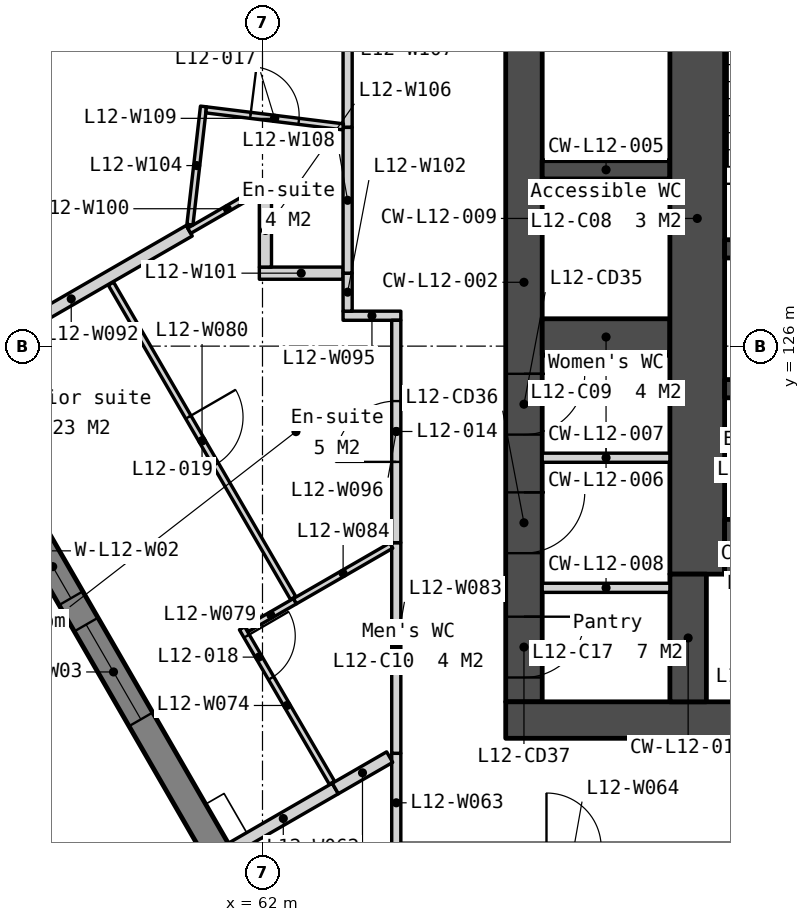
"""IFC4 building model, lengths in metres.
Left out: names, types, materials, properties, quantities, classifications, styles, units other than length and angle.
Written with IfcOpenShell. Run it as: python <this file> out.ifc"""

import sys

from ifc_helpers import new_model, si_unit, direction, frame, frame_2d, origin, origin_2d, place, context, subcontext, project, spatial, polyline, rectangle, outline, extrude, element, fill, save


model = new_model("IFC4")
c1 = context("Model", 3, precision=1e-05, world=origin(), true_north=direction((0.0, 1.0)))
c2 = subcontext(c1, "Body", "Model", "MODEL_VIEW")
j1 = project(units=[si_unit("LENGTHUNIT", "METRE"), si_unit("PLANEANGLEUNIT", "RADIAN")], contexts=[c1])
p1 = place(None, origin())
s1 = spatial("IfcSite", under=j1, at=p1, CompositionType="ELEMENT")
p2 = place(p1, origin())
s2 = spatial("IfcBuilding", under=s1, at=p2, CompositionType="ELEMENT")
p3 = place(p2, frame((0.0, 0.0, 56.0)))
s3 = spatial("IfcBuildingStorey", under=s2, at=p3, CompositionType="ELEMENT", Elevation=56.0)
p4 = place(p3, frame((57.336, 131.342, 0.0), z_axis=(0.0, 0.0, 1.0), x_axis=(-0.5, -0.866025403784, 0.0)))
e1 = element("IfcColumn", 1, at=p4, inside=s3, PredefinedType="COLUMN", context=c2, shape_type="SweptSolid", body=[
    extrude(rectangle(XDim=2.0, YDim=2.0, at=origin_2d()), origin(), (0.0, 0.0, 1.0), 3.5),
])
p5 = place(p3, frame((66.3, 133.95, 0.0), z_axis=(0.0, 0.0, 1.0), x_axis=(0.0, -1.0, 0.0)))
e2 = element("IfcWall", 2, at=p5, inside=s3, PredefinedType="SOLIDWALL", context=c2, shape_type="SweptSolid", body=[
    extrude(rectangle(XDim=13.8, YDim=0.6, at=frame_2d((6.9, 0.0))), origin(), (0.0, 0.0, 1.0), 3.35),
])
p6 = place(p5, frame((0.6, 0.0, 0.0)))
e3 = element("IfcOpeningElement", 3, at=p6, cuts=e2, PredefinedType="OPENING", context=c2, shape_type="SweptSolid", body=[
    extrude(rectangle(XDim=1.1, YDim=2.1, at=frame_2d((0.55, 1.05))), frame((0.0, 0.31, 0.0), z_axis=(0.0, -1.0, 0.0), x_axis=(1.0, 0.0, 0.0)), (0.0, 0.0, 1.0), 0.62),
])
p7 = place(p5, frame((8.405, 0.0, 0.0)))
e4 = element("IfcOpeningElement", 4, at=p7, cuts=e2, PredefinedType="OPENING", context=c2, shape_type="SweptSolid", body=[
    extrude(rectangle(XDim=1.0, YDim=2.1, at=frame_2d((0.5, 1.05))), frame((0.0, 0.31, 0.0), z_axis=(0.0, -1.0, 0.0), x_axis=(1.0, 0.0, 0.0)), (0.0, 0.0, 1.0), 0.62),
])
p8 = place(p5, frame((10.355, 0.0, 0.0)))
e5 = element("IfcOpeningElement", 5, at=p8, cuts=e2, PredefinedType="OPENING", context=c2, shape_type="SweptSolid", body=[
    extrude(rectangle(XDim=1.0, YDim=2.1, at=frame_2d((0.5, 1.05))), frame((0.0, 0.31, 0.0), z_axis=(0.0, -1.0, 0.0), x_axis=(1.0, 0.0, 0.0)), (0.0, 0.0, 1.0), 0.62),
])
p9 = place(p5, frame((12.4, 0.0, 0.0)))
e6 = element("IfcOpeningElement", 6, at=p9, cuts=e2, PredefinedType="OPENING", context=c2, shape_type="SweptSolid", body=[
    extrude(rectangle(XDim=1.0, YDim=2.1, at=frame_2d((0.5, 1.05))), frame((0.0, 0.31, 0.0), z_axis=(0.0, -1.0, 0.0), x_axis=(1.0, 0.0, 0.0)), (0.0, 0.0, 1.0), 0.62),
])
p10 = place(p3, frame((66.0, 119.85, 0.0), z_axis=(0.0, 0.0, 1.0), x_axis=(1.0, 0.0, 0.0)))
e7 = element("IfcWall", 7, at=p10, inside=s3, PredefinedType="SOLIDWALL", context=c2, shape_type="SweptSolid", body=[
    extrude(rectangle(XDim=28.0, YDim=0.6, at=frame_2d((14.0, 0.0))), origin(), (0.0, 0.0, 1.0), 3.35),
])
p11 = place(p10, frame((6.825, 0.0, 0.0)))
e8 = element("IfcOpeningElement", 8, at=p11, cuts=e7, PredefinedType="OPENING", context=c2, shape_type="SweptSolid", body=[
    extrude(rectangle(XDim=1.8, YDim=2.1, at=frame_2d((0.9, 1.05))), frame((0.0, 0.31, 0.0), z_axis=(0.0, -1.0, 0.0), x_axis=(1.0, 0.0, 0.0)), (0.0, 0.0, 1.0), 0.62),
])
p12 = place(p10, frame((15.85, 0.0, 0.0)))
e9 = element("IfcOpeningElement", 9, at=p12, cuts=e7, PredefinedType="OPENING", context=c2, shape_type="SweptSolid", body=[
    extrude(rectangle(XDim=1.5, YDim=2.1, at=frame_2d((0.75, 1.05))), frame((0.0, 0.31, 0.0), z_axis=(0.0, -1.0, 0.0), x_axis=(1.0, 0.0, 0.0)), (0.0, 0.0, 1.0), 0.62),
])
p13 = place(p10, frame((19.375, 0.0, 0.0)))
e10 = element("IfcOpeningElement", 10, at=p13, cuts=e7, PredefinedType="OPENING", context=c2, shape_type="SweptSolid", body=[
    extrude(rectangle(XDim=1.8, YDim=2.1, at=frame_2d((0.9, 1.05))), frame((0.0, 0.31, 0.0), z_axis=(0.0, -1.0, 0.0), x_axis=(1.0, 0.0, 0.0)), (0.0, 0.0, 1.0), 0.62),
])
p14 = place(p10, frame((4.425, 0.0, 0.0)))
e11 = element("IfcOpeningElement", 11, at=p14, cuts=e7, PredefinedType="OPENING", context=c2, shape_type="SweptSolid", body=[
    extrude(rectangle(XDim=1.0, YDim=2.1, at=frame_2d((0.5, 1.05))), frame((0.0, 0.31, 0.0), z_axis=(0.0, -1.0, 0.0), x_axis=(1.0, 0.0, 0.0)), (0.0, 0.0, 1.0), 0.62),
])
p15 = place(p10, frame((9.783, 0.0, 0.0)))
e12 = element("IfcOpeningElement", 12, at=p15, cuts=e7, PredefinedType="OPENING", context=c2, shape_type="SweptSolid", body=[
    extrude(rectangle(XDim=1.0, YDim=2.1, at=frame_2d((0.5, 1.05))), frame((0.0, 0.31, 0.0), z_axis=(0.0, -1.0, 0.0), x_axis=(1.0, 0.0, 0.0)), (0.0, 0.0, 1.0), 0.62),
])
p16 = place(p10, frame((11.525, 0.0, 0.0)))
e13 = element("IfcOpeningElement", 13, at=p16, cuts=e7, PredefinedType="OPENING", context=c2, shape_type="SweptSolid", body=[
    extrude(rectangle(XDim=1.0, YDim=2.1, at=frame_2d((0.5, 1.05))), frame((0.0, 0.31, 0.0), z_axis=(0.0, -1.0, 0.0), x_axis=(1.0, 0.0, 0.0)), (0.0, 0.0, 1.0), 0.62),
])
p17 = place(p10, frame((13.658, 0.0, 0.0)))
e14 = element("IfcOpeningElement", 14, at=p17, cuts=e7, PredefinedType="OPENING", context=c2, shape_type="SweptSolid", body=[
    extrude(rectangle(XDim=1.0, YDim=2.1, at=frame_2d((0.5, 1.05))), frame((0.0, 0.31, 0.0), z_axis=(0.0, -1.0, 0.0), x_axis=(1.0, 0.0, 0.0)), (0.0, 0.0, 1.0), 0.62),
])
p18 = place(p10, frame((21.725, 0.0, 0.0)))
e15 = element("IfcOpeningElement", 15, at=p18, cuts=e7, PredefinedType="OPENING", context=c2, shape_type="SweptSolid", body=[
    extrude(rectangle(XDim=1.0, YDim=2.1, at=frame_2d((0.5, 1.05))), frame((0.0, 0.31, 0.0), z_axis=(0.0, -1.0, 0.0), x_axis=(1.0, 0.0, 0.0)), (0.0, 0.0, 1.0), 0.62),
])
p19 = place(p10, frame((23.425, 0.0, 0.0)))
e16 = element("IfcOpeningElement", 16, at=p19, cuts=e7, PredefinedType="OPENING", context=c2, shape_type="SweptSolid", body=[
    extrude(rectangle(XDim=1.0, YDim=2.1, at=frame_2d((0.5, 1.05))), frame((0.0, 0.31, 0.0), z_axis=(0.0, -1.0, 0.0), x_axis=(1.0, 0.0, 0.0)), (0.0, 0.0, 1.0), 0.62),
])
p20 = place(p3, frame((66.6, 128.9, 0.0), z_axis=(0.0, 0.0, 1.0), x_axis=(1.0, 0.0, 0.0)))
e17 = element("IfcWall", 17, at=p20, inside=s3, PredefinedType="SOLIDWALL", context=c2, shape_type="SweptSolid", body=[
    extrude(rectangle(XDim=2.1, YDim=0.3, at=frame_2d((1.05, 0.0))), origin(), (0.0, 0.0, 1.0), 3.35),
])
p21 = place(p3, frame((66.6, 126.15, 0.0), z_axis=(0.0, 0.0, 1.0), x_axis=(1.0, 0.0, 0.0)))
e18 = element("IfcWall", 18, at=p21, inside=s3, PredefinedType="SOLIDWALL", context=c2, shape_type="SweptSolid", body=[
    extrude(rectangle(XDim=2.1, YDim=0.6, at=frame_2d((1.05, 0.0))), origin(), (0.0, 0.0, 1.0), 3.35),
])
for number, where, z_axis, x_axis in (
    (19, (66.6, 124.165, 0.0), (0.0, 0.0, 1.0), (1.0, 0.0, 0.0)),
    (20, (66.6, 122.025, 0.0), (0.0, 0.0, 1.0), (1.0, 0.0, 0.0)),
):
    element("IfcWall", number, at=place(p3, frame(where, z_axis=z_axis, x_axis=x_axis)), inside=s3, PredefinedType="PARTITIONING", context=c2, shape_type="SweptSolid", body=[
        extrude(rectangle(XDim=2.1, YDim=0.15, at=frame_2d((1.05, 0.0))), origin(), (0.0, 0.0, 1.0), 3.35),
    ])
p22 = place(p3, frame((69.15, 133.95, 0.0), z_axis=(0.0, 0.0, 1.0), x_axis=(0.0, -1.0, 0.0)))
e21 = element("IfcWall", 21, at=p22, inside=s3, PredefinedType="SOLIDWALL", context=c2, shape_type="SweptSolid", body=[
    extrude(rectangle(XDim=11.7, YDim=0.9, at=frame_2d((5.85, 0.0))), origin(), (0.0, 0.0, 1.0), 3.35),
])
p23 = place(p3, frame((69.0, 122.25, 0.0), z_axis=(0.0, 0.0, 1.0), x_axis=(0.0, -1.0, 0.0)))
e22 = element("IfcWall", 22, at=p23, inside=s3, PredefinedType="SOLIDWALL", context=c2, shape_type="SweptSolid", body=[
    extrude(rectangle(XDim=2.1, YDim=0.6, at=frame_2d((1.05, 0.0))), origin(), (0.0, 0.0, 1.0), 3.35),
])
for number, where, z_axis, x_axis in (
    (23, (69.6, 127.6, 0.0), (0.0, 0.0, 1.0), (1.0, 0.0, 0.0)),
    (24, (69.6, 125.3, 0.0), (0.0, 0.0, 1.0), (1.0, 0.0, 0.0)),
):
    element("IfcWall", number, at=place(p3, frame(where, z_axis=z_axis, x_axis=x_axis)), inside=s3, PredefinedType="SOLIDWALL", context=c2, shape_type="SweptSolid", body=[
        extrude(rectangle(XDim=2.55, YDim=0.3, at=frame_2d((1.275, 0.0))), origin(), (0.0, 0.0, 1.0), 3.35),
    ])
p24 = place(p3, frame((69.6, 122.7, 0.0), z_axis=(0.0, 0.0, 1.0), x_axis=(1.0, 0.0, 0.0)))
e25 = element("IfcWall", 25, at=p24, inside=s3, PredefinedType="SOLIDWALL", context=c2, shape_type="SweptSolid", body=[
    extrude(rectangle(XDim=2.55, YDim=0.9, at=frame_2d((1.275, 0.0))), origin(), (0.0, 0.0, 1.0), 3.35),
])
p25 = place(p3, frame((54.495, 129.397, -0.15), z_axis=(0.0, 0.0, 1.0), x_axis=(0.499995201193, -0.866028174359, 0.0)))
e26 = element("IfcWall", 26, at=p25, inside=s3, PredefinedType="SOLIDWALL", context=c2, shape_type="SweptSolid", body=[
    extrude(outline(polyline([(0.0, 0.0), (0.0, 3.5), (16.22, 3.5), (16.22, 0.0), (0.0, 0.0)])), frame((0.0, 0.225, 0.0), z_axis=(0.0, -1.0, 0.0), x_axis=(1.0, 0.0, 0.0)), (0.0, 0.0, 1.0), 0.45),
])
p26 = place(p25, frame((0.786, 0.0, 1.05)))
e27 = element("IfcOpeningElement", 27, at=p26, cuts=e26, PredefinedType="OPENING", context=c2, shape_type="SweptSolid", body=[
    extrude(rectangle(XDim=1.2, YDim=1.5, at=frame_2d((0.6, 0.75))), frame((0.0, 0.235, 0.0), z_axis=(0.0, -1.0, 0.0), x_axis=(1.0, 0.0, 0.0)), (0.0, 0.0, 1.0), 0.47),
])
p27 = place(p25, frame((6.91, 0.0, 1.05)))
e28 = element("IfcOpeningElement", 28, at=p27, cuts=e26, PredefinedType="OPENING", context=c2, shape_type="SweptSolid", body=[
    extrude(rectangle(XDim=1.8, YDim=1.5, at=frame_2d((0.9, 0.75))), frame((0.0, 0.235, 0.0), z_axis=(0.0, -1.0, 0.0), x_axis=(1.0, 0.0, 0.0)), (0.0, 0.0, 1.0), 0.47),
])
p28 = place(p25, frame((9.21, 0.0, 1.05)))
e29 = element("IfcOpeningElement", 29, at=p28, cuts=e26, PredefinedType="OPENING", context=c2, shape_type="SweptSolid", body=[
    extrude(rectangle(XDim=1.8, YDim=1.5, at=frame_2d((0.9, 0.75))), frame((0.0, 0.235, 0.0), z_axis=(0.0, -1.0, 0.0), x_axis=(1.0, 0.0, 0.0)), (0.0, 0.0, 1.0), 0.47),
])
p29 = place(p3, frame((61.487, 117.737, 0.0), z_axis=(0.0, 0.0, 1.0), x_axis=(0.866051805705, 0.499954267743, 0.0)))
e30 = element("IfcWall", 30, at=p29, inside=s3, PredefinedType="PARTITIONING", context=c2, shape_type="SweptSolid", body=[
    extrude(rectangle(XDim=1.975, YDim=0.2, at=frame_2d((0.988, 0.0))), origin(), (0.0, 0.0, 1.0), 3.35),
])
p30 = place(p3, frame((64.2, 117.675, 0.0), z_axis=(0.0, 0.0, 1.0), x_axis=(0.0, 1.0, 0.0)))
e31 = element("IfcWall", 31, at=p30, inside=s3, PredefinedType="PARTITIONING", context=c2, shape_type="SweptSolid", body=[
    extrude(rectangle(XDim=1.628, YDim=0.15, at=frame_2d((0.814, 0.0))), origin(), (0.0, 0.0, 1.0), 3.35),
])
p31 = place(p3, frame((61.663, 121.361, 0.0), z_axis=(0.0, 0.0, 1.0), x_axis=(0.502884554521, -0.864353587847, 0.0)))
e32 = element("IfcWall", 32, at=p31, inside=s3, PredefinedType="PARTITIONING", context=c2, shape_type="SweptSolid", body=[
    extrude(rectangle(XDim=2.94, YDim=0.1, at=frame_2d((1.47, 0.0))), origin(), (0.0, 0.0, 1.0), 3.35),
])
p32 = place(p31, frame((0.15, 0.0, 0.0)))
e33 = element("IfcOpeningElement", 33, at=p32, cuts=e32, PredefinedType="OPENING", context=c2, shape_type="SweptSolid", body=[
    extrude(rectangle(XDim=0.8, YDim=2.1, at=frame_2d((0.4, 1.05))), frame((0.0, 0.06, 0.0), z_axis=(0.0, -1.0, 0.0), x_axis=(1.0, 0.0, 0.0)), (0.0, 0.0, 1.0), 0.12),
])
p33 = place(p3, frame((63.197, 118.724, 0.0), z_axis=(0.0, 0.0, 1.0), x_axis=(0.86596515875, 0.500104332946, 0.0)))
e34 = element("IfcWall", 34, at=p33, inside=s3, PredefinedType="PARTITIONING", context=c2, shape_type="SweptSolid", body=[
    extrude(rectangle(XDim=1.033, YDim=0.2, at=frame_2d((0.517, 0.0))), origin(), (0.0, 0.0, 1.0), 3.35),
])
p34 = place(p3, frame((61.74, 121.347, 0.0), z_axis=(0.0, 0.0, 1.0), x_axis=(0.866136792161, 0.499807020023, 0.0)))
e35 = element("IfcWall", 35, at=p34, inside=s3, PredefinedType="PARTITIONING", context=c2, shape_type="SweptSolid", body=[
    extrude(rectangle(XDim=0.916, YDim=0.1, at=frame_2d((0.458, 0.0))), origin(), (0.0, 0.0, 1.0), 3.35),
])
p35 = place(p3, frame((59.508, 127.028, 0.0), z_axis=(0.0, 0.0, 1.0), x_axis=(0.501422739792, -0.865202424881, 0.0)))
e36 = element("IfcWall", 36, at=p35, inside=s3, PredefinedType="PARTITIONING", context=c2, shape_type="SweptSolid", body=[
    extrude(rectangle(XDim=5.976, YDim=0.1, at=frame_2d((2.988, 0.0))), origin(), (0.0, 0.0, 1.0), 3.35),
])
p36 = place(p35, frame((2.538, 0.0, 0.0)))
e37 = element("IfcOpeningElement", 37, at=p36, cuts=e36, PredefinedType="OPENING", context=c2, shape_type="SweptSolid", body=[
    extrude(rectangle(XDim=0.9, YDim=2.1, at=frame_2d((0.45, 1.05))), frame((0.0, 0.06, 0.0), z_axis=(0.0, -1.0, 0.0), x_axis=(1.0, 0.0, 0.0)), (0.0, 0.0, 1.0), 0.12),
])
p37 = place(p3, frame((64.2, 119.303, 0.0), z_axis=(0.0, 0.0, 1.0), x_axis=(0.0, 1.0, 0.0)))
e38 = element("IfcWall", 38, at=p37, inside=s3, PredefinedType="PARTITIONING", context=c2, shape_type="SweptSolid", body=[
    extrude(rectangle(XDim=3.464, YDim=0.15, at=frame_2d((1.732, 0.0))), origin(), (0.0, 0.0, 1.0), 3.35),
])
p38 = place(p3, frame((62.534, 121.805, 0.0), z_axis=(0.0, 0.0, 1.0), x_axis=(0.866007702746, 0.500030657845, 0.0)))
e39 = element("IfcWall", 39, at=p38, inside=s3, PredefinedType="PARTITIONING", context=c2, shape_type="SweptSolid", body=[
    extrude(rectangle(XDim=1.829, YDim=0.1, at=frame_2d((0.914, 0.0))), origin(), (0.0, 0.0, 1.0), 3.35),
])
p39 = place(p3, frame((56.914, 125.657, 0.0), z_axis=(0.0, 0.0, 1.0), x_axis=(0.866018671298, 0.500011660828, 0.0)))
e40 = element("IfcWall", 40, at=p39, inside=s3, PredefinedType="PARTITIONING", context=c2, shape_type="SweptSolid", body=[
    extrude(rectangle(XDim=4.482, YDim=0.2, at=frame_2d((2.241, 0.0))), origin(), (0.0, 0.0, 1.0), 3.35),
])
p40 = place(p3, frame((63.325, 126.5, 0.0), z_axis=(0.0, 0.0, 1.0), x_axis=(1.0, 0.0, 0.0)))
e41 = element("IfcWall", 41, at=p40, inside=s3, PredefinedType="PARTITIONING", context=c2, shape_type="SweptSolid", body=[
    extrude(rectangle(XDim=0.95, YDim=0.15, at=frame_2d((0.475, 0.0))), origin(), (0.0, 0.0, 1.0), 3.35),
])
p41 = place(p3, frame((64.2, 122.767, 0.0), z_axis=(0.0, 0.0, 1.0), x_axis=(0.0, 1.0, 0.0)))
e42 = element("IfcWall", 42, at=p41, inside=s3, PredefinedType="PARTITIONING", context=c2, shape_type="SweptSolid", body=[
    extrude(rectangle(XDim=3.658, YDim=0.15, at=frame_2d((1.829, 0.0))), origin(), (0.0, 0.0, 1.0), 3.35),
])
p42 = place(p41, frame((1.329, 0.0, 0.0)))
e43 = element("IfcOpeningElement", 43, at=p42, cuts=e42, PredefinedType="OPENING", context=c2, shape_type="SweptSolid", body=[
    extrude(rectangle(XDim=1.0, YDim=2.1, at=frame_2d((0.5, 1.05))), frame((0.0, 0.085, 0.0), z_axis=(0.0, -1.0, 0.0), x_axis=(1.0, 0.0, 0.0)), (0.0, 0.0, 1.0), 0.17),
])
p43 = place(p3, frame((60.795, 127.898, 0.0), z_axis=(0.0, 0.0, 1.0), x_axis=(0.866022596503, 0.500004862322, 0.0)))
e44 = element("IfcWall", 44, at=p43, inside=s3, PredefinedType="PARTITIONING", context=c2, shape_type="SweptSolid", body=[
    extrude(rectangle(XDim=1.447, YDim=0.1, at=frame_2d((0.723, 0.0))), origin(), (0.0, 0.0, 1.0), 3.35),
])
p44 = place(p3, frame((61.948, 127.2, 0.0), z_axis=(0.0, 0.0, 1.0), x_axis=(1.0, 0.0, 0.0)))
e45 = element("IfcWall", 45, at=p44, inside=s3, PredefinedType="PARTITIONING", context=c2, shape_type="SweptSolid", body=[
    extrude(rectangle(XDim=1.377, YDim=0.2, at=frame_2d((0.688, 0.0))), origin(), (0.0, 0.0, 1.0), 3.35),
])
p45 = place(p3, frame((63.4, 126.575, 0.0), z_axis=(0.0, 0.0, 1.0), x_axis=(0.0, 1.0, 0.0)))
e46 = element("IfcWall", 46, at=p45, inside=s3, PredefinedType="PARTITIONING", context=c2, shape_type="SweptSolid", body=[
    extrude(rectangle(XDim=0.625, YDim=0.15, at=frame_2d((0.312, 0.0))), origin(), (0.0, 0.0, 1.0), 3.35),
])
p46 = place(p3, frame((60.806, 127.997, 0.0), z_axis=(0.0, 0.0, 1.0), x_axis=(0.114018020477, 0.993478681707, 0.0)))
e47 = element("IfcWall", 47, at=p46, inside=s3, PredefinedType="PARTITIONING", context=c2, shape_type="SweptSolid", body=[
    extrude(rectangle(XDim=1.957, YDim=0.1, at=frame_2d((0.979, 0.0))), origin(), (0.0, 0.0, 1.0), 3.35),
])
p47 = place(p3, frame((62.048, 127.3, 0.0), z_axis=(0.0, 0.0, 1.0), x_axis=(0.0, 1.0, 0.0)))
e48 = element("IfcWall", 48, at=p47, inside=s3, PredefinedType="PARTITIONING", context=c2, shape_type="SweptSolid", body=[
    extrude(rectangle(XDim=1.206, YDim=0.2, at=frame_2d((0.603, 0.0))), origin(), (0.0, 0.0, 1.0), 3.35),
])
p48 = place(p3, frame((63.4, 129.597, 0.0), z_axis=(0.0, 0.0, 1.0), x_axis=(0.0, 1.0, 0.0)))
e49 = element("IfcWall", 49, at=p48, inside=s3, PredefinedType="PARTITIONING", context=c2, shape_type="SweptSolid", body=[
    extrude(rectangle(XDim=4.477, YDim=0.15, at=frame_2d((2.239, 0.0))), origin(), (0.0, 0.0, 1.0), 3.35),
])
p49 = place(p48, frame((1.789, 0.0, 0.0)))
e50 = element("IfcOpeningElement", 50, at=p49, cuts=e49, PredefinedType="OPENING", context=c2, shape_type="SweptSolid", body=[
    extrude(rectangle(XDim=0.9, YDim=2.1, at=frame_2d((0.45, 1.05))), frame((0.0, 0.085, 0.0), z_axis=(0.0, -1.0, 0.0), x_axis=(1.0, 0.0, 0.0)), (0.0, 0.0, 1.0), 0.17),
])
p50 = place(p3, frame((63.4, 127.2, 0.0), z_axis=(0.0, 0.0, 1.0), x_axis=(0.0, 1.0, 0.0)))
e51 = element("IfcWall", 51, at=p50, inside=s3, PredefinedType="PARTITIONING", context=c2, shape_type="SweptSolid", body=[
    extrude(rectangle(XDim=2.397, YDim=0.15, at=frame_2d((1.199, 0.0))), origin(), (0.0, 0.0, 1.0), 3.35),
])
p51 = place(p3, frame((61.073, 129.886, 0.0), z_axis=(0.0, 0.0, 1.0), x_axis=(0.992399852351, -0.123055000118, 0.0)))
e52 = element("IfcWall", 52, at=p51, inside=s3, PredefinedType="PARTITIONING", context=c2, shape_type="SweptSolid", body=[
    extrude(rectangle(XDim=2.27, YDim=0.1, at=frame_2d((1.135, 0.0))), origin(), (0.0, 0.0, 1.0), 3.35),
])
p52 = place(p51, frame((0.735, 0.0, 0.0)))
e53 = element("IfcOpeningElement", 53, at=p52, cuts=e52, PredefinedType="OPENING", context=c2, shape_type="SweptSolid", body=[
    extrude(rectangle(XDim=0.8, YDim=2.1, at=frame_2d((0.4, 1.05))), frame((0.0, 0.06, 0.0), z_axis=(0.0, -1.0, 0.0), x_axis=(1.0, 0.0, 0.0)), (0.0, 0.0, 1.0), 0.12),
])
p53 = place(p7, origin())
e54 = element("IfcDoor", 54, at=p53, inside=s3, OperationType="SINGLE_SWING_LEFT", PredefinedType="DOOR", context=c2, shape_type="SweptSolid", body=[
    extrude(rectangle(XDim=1.0, YDim=2.1, at=frame_2d((0.5, 1.05))), frame((0.0, 0.025, 0.0), z_axis=(0.0, -1.0, 0.0), x_axis=(1.0, 0.0, 0.0)), (0.0, 0.0, 1.0), 0.05),
])
fill(e4, e54)
p54 = place(p8, origin())
e55 = element("IfcDoor", 55, at=p54, inside=s3, OperationType="SINGLE_SWING_LEFT", PredefinedType="DOOR", context=c2, shape_type="SweptSolid", body=[
    extrude(rectangle(XDim=1.0, YDim=2.1, at=frame_2d((0.5, 1.05))), frame((0.0, 0.025, 0.0), z_axis=(0.0, -1.0, 0.0), x_axis=(1.0, 0.0, 0.0)), (0.0, 0.0, 1.0), 0.05),
])
fill(e5, e55)
p55 = place(p9, origin())
e56 = element("IfcDoor", 56, at=p55, inside=s3, OperationType="SINGLE_SWING_LEFT", PredefinedType="DOOR", context=c2, shape_type="SweptSolid", body=[
    extrude(rectangle(XDim=1.0, YDim=2.1, at=frame_2d((0.5, 1.05))), frame((0.0, 0.025, 0.0), z_axis=(0.0, -1.0, 0.0), x_axis=(1.0, 0.0, 0.0)), (0.0, 0.0, 1.0), 0.05),
])
fill(e6, e56)
p56 = place(p27, origin())
e57 = element("IfcWindow", 57, at=p56, inside=s3, PartitioningType="SINGLE_PANEL", PredefinedType="WINDOW", context=c2, shape_type="SweptSolid", body=[
    extrude(rectangle(XDim=1.8, YDim=1.5, at=frame_2d((0.9, 0.75))), frame((0.0, 0.03, 0.0), z_axis=(0.0, -1.0, 0.0), x_axis=(1.0, 0.0, 0.0)), (0.0, 0.0, 1.0), 0.06),
])
fill(e28, e57)
p57 = place(p28, origin())
e58 = element("IfcWindow", 58, at=p57, inside=s3, PartitioningType="SINGLE_PANEL", PredefinedType="WINDOW", context=c2, shape_type="SweptSolid", body=[
    extrude(rectangle(XDim=1.8, YDim=1.5, at=frame_2d((0.9, 0.75))), frame((0.0, 0.03, 0.0), z_axis=(0.0, -1.0, 0.0), x_axis=(1.0, 0.0, 0.0)), (0.0, 0.0, 1.0), 0.06),
])
fill(e29, e58)
p58 = place(p42, origin())
e59 = element("IfcDoor", 59, at=p58, inside=s3, OperationType="SINGLE_SWING_LEFT", PredefinedType="DOOR", context=c2, shape_type="SweptSolid", body=[
    extrude(rectangle(XDim=1.0, YDim=2.1, at=frame_2d((0.5, 1.05))), frame((0.0, 0.025, 0.0), z_axis=(0.0, -1.0, 0.0), x_axis=(1.0, 0.0, 0.0)), (0.0, 0.0, 1.0), 0.05),
])
fill(e43, e59)
p59 = place(p52, origin())
e60 = element("IfcDoor", 60, at=p59, inside=s3, OperationType="SINGLE_SWING_LEFT", PredefinedType="DOOR", context=c2, shape_type="SweptSolid", body=[
    extrude(rectangle(XDim=0.8, YDim=2.1, at=frame_2d((0.4, 1.05))), frame((0.0, 0.025, 0.0), z_axis=(0.0, -1.0, 0.0), x_axis=(1.0, 0.0, 0.0)), (0.0, 0.0, 1.0), 0.05),
])
fill(e53, e60)
p60 = place(p32, origin())
e61 = element("IfcDoor", 61, at=p60, inside=s3, OperationType="SINGLE_SWING_LEFT", PredefinedType="DOOR", context=c2, shape_type="SweptSolid", body=[
    extrude(rectangle(XDim=0.8, YDim=2.1, at=frame_2d((0.4, 1.05))), frame((0.0, 0.025, 0.0), z_axis=(0.0, -1.0, 0.0), x_axis=(1.0, 0.0, 0.0)), (0.0, 0.0, 1.0), 0.05),
])
fill(e33, e61)
p61 = place(p36, origin())
e62 = element("IfcDoor", 62, at=p61, inside=s3, OperationType="SINGLE_SWING_LEFT", PredefinedType="DOOR", context=c2, shape_type="SweptSolid", body=[
    extrude(rectangle(XDim=0.9, YDim=2.1, at=frame_2d((0.45, 1.05))), frame((0.0, 0.025, 0.0), z_axis=(0.0, -1.0, 0.0), x_axis=(1.0, 0.0, 0.0)), (0.0, 0.0, 1.0), 0.05),
])
fill(e37, e62)
save(model, sys.argv[1])
